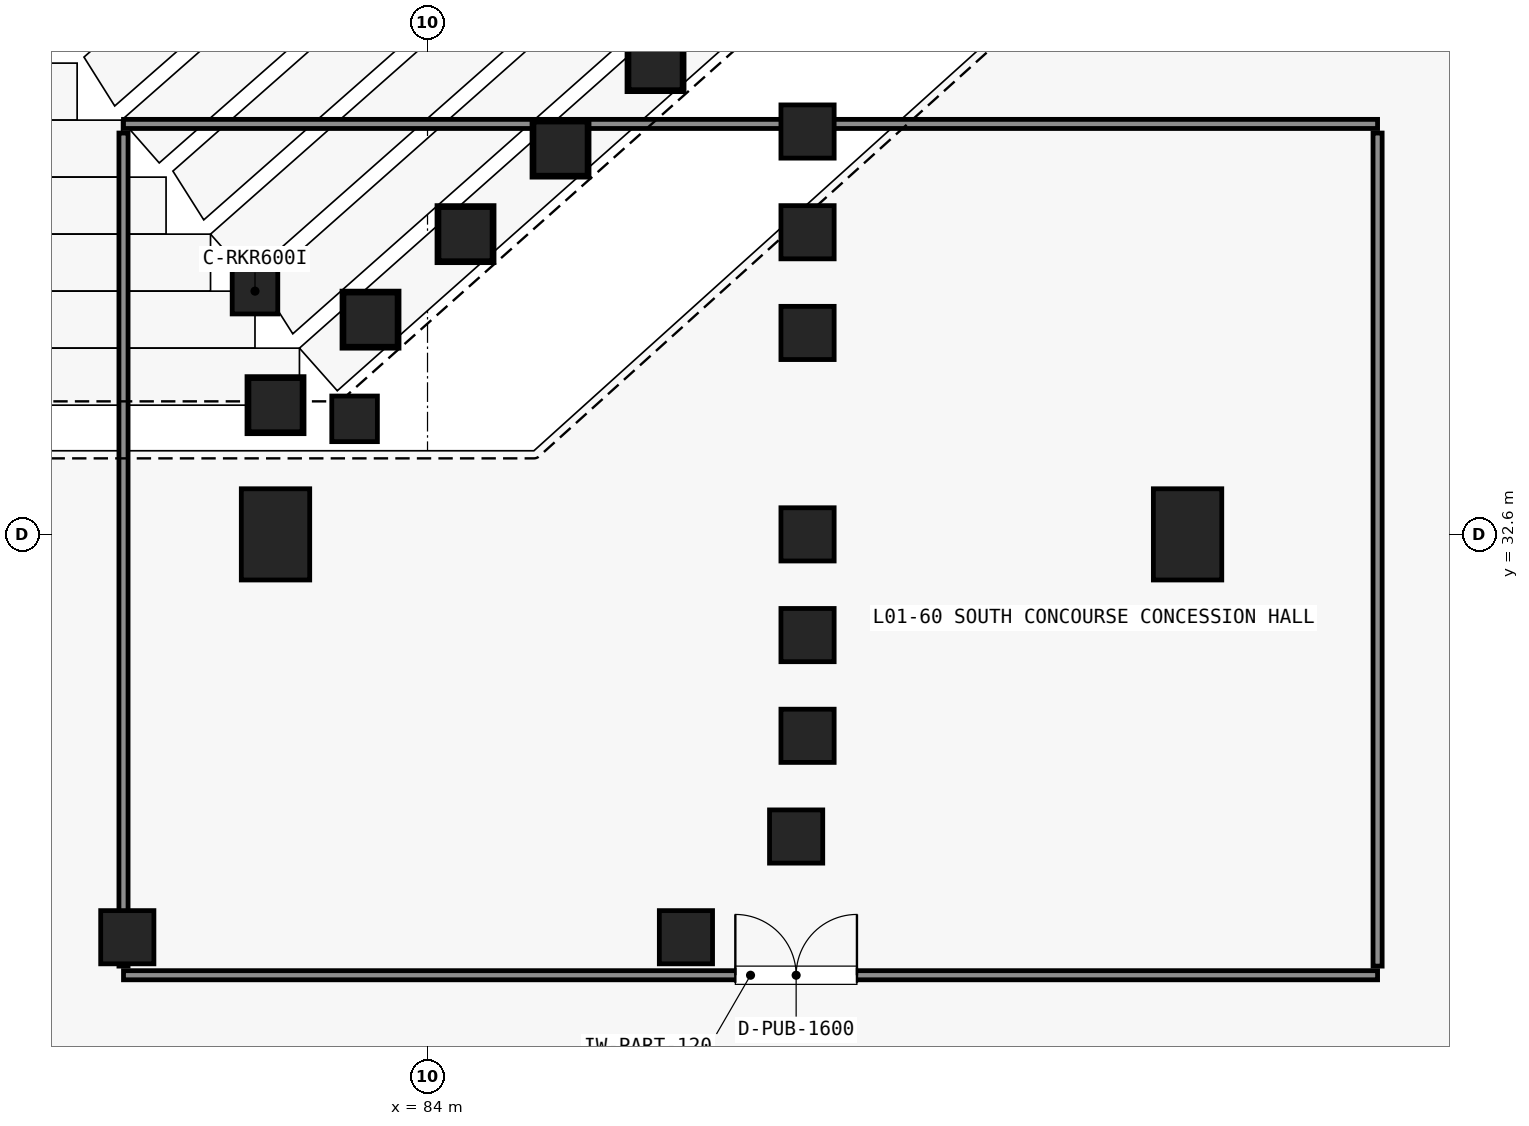
"""IFC4 building model, lengths in metres.
Left out: names, types, materials, properties, quantities, classifications, styles, units other than length and angle.
Written with IfcOpenShell. Run it as: python <this file> out.ifc"""

import sys

from ifc_helpers import new_model, si_unit, direction, frame, frame_2d, origin, origin_2d, place, context, subcontext, project, spatial, rectangle, extrude, element, fill, save


model = new_model("IFC4")
c1 = context("Model", 3, precision=1e-05, world=origin(), true_north=direction((0.0, 1.0)))
c2 = subcontext(c1, "Body", "Model", "MODEL_VIEW")
j1 = project(units=[si_unit("LENGTHUNIT", "METRE"), si_unit("PLANEANGLEUNIT", "RADIAN")], contexts=[c1])
p1 = place(None, origin())
s1 = spatial("IfcSite", under=j1, at=p1, CompositionType="ELEMENT")
p2 = place(p1, origin())
s2 = spatial("IfcBuilding", under=s1, at=p2, CompositionType="ELEMENT")
p3 = place(p2, frame((0.0, 0.0, 6.0)))
s3 = spatial("IfcBuildingStorey", under=s2, at=p3, CompositionType="ELEMENT", Elevation=6.0)
for number, where, z_axis, x_axis in (
    (1, (82.0, 32.6, 0.0), (0.0, 0.0, 1.0), (1.0, 0.0, 0.0)),
    (2, (94.0, 32.6, 0.0), (0.0, 0.0, 1.0), (1.0, 0.0, 0.0)),
):
    element("IfcColumn", number, at=place(p3, frame(where, z_axis=z_axis, x_axis=x_axis)), inside=s3, PredefinedType="COLUMN", context=c2, shape_type="SweptSolid", body=[
        extrude(rectangle(XDim=0.9, YDim=1.2, at=origin_2d()), origin(), (0.0, 0.0, 1.0), 5.4),
    ])
p4 = place(p3, frame((80.05, 27.3, 0.0), z_axis=(0.0, 0.0, 1.0), x_axis=(1.0, 0.0, 0.0)))
e3 = element("IfcColumn", 3, at=p4, inside=s3, PredefinedType="COLUMN", context=c2, shape_type="SweptSolid", body=[
    extrude(rectangle(XDim=0.7, YDim=0.7, at=origin_2d()), origin(), (0.0, 0.0, 1.0), 5.4),
])
p5 = place(p3, frame((82.0, 34.3, 0.0), z_axis=(0.0, 0.0, 1.0), x_axis=(1.0, 0.0, 0.0)))
e4 = element("IfcColumn", 4, at=p5, inside=s3, PredefinedType="COLUMN", context=c2, shape_type="SweptSolid", body=[
    extrude(rectangle(XDim=0.75, YDim=0.75, at=origin_2d()), origin(), (0.0, 0.0, 1.0), 2.55),
])
p6 = place(p3, frame((82.0, 34.3, 2.55), z_axis=(0.0, 0.0, 1.0), x_axis=(1.0, 0.0, 0.0)))
e5 = element("IfcColumn", 5, at=p6, inside=s3, PredefinedType="COLUMN", context=c2, shape_type="SweptSolid", body=[
    extrude(rectangle(XDim=0.7, YDim=0.7, at=origin_2d()), origin(), (0.0, 0.0, 1.0), 2.85),
])
p7 = place(p3, frame((87.4, 27.3, 0.0), z_axis=(0.0, 0.0, 1.0), x_axis=(1.0, 0.0, 0.0)))
e6 = element("IfcColumn", 6, at=p7, inside=s3, PredefinedType="COLUMN", context=c2, shape_type="SweptSolid", body=[
    extrude(rectangle(XDim=0.7, YDim=0.7, at=origin_2d()), origin(), (0.0, 0.0, 1.0), 5.4),
])
p8 = place(p3, frame((83.25, 35.425, 0.0), z_axis=(0.0, 0.0, 1.0), x_axis=(1.0, 0.0, 0.0)))
e7 = element("IfcColumn", 7, at=p8, inside=s3, PredefinedType="COLUMN", context=c2, shape_type="SweptSolid", body=[
    extrude(rectangle(XDim=0.75, YDim=0.75, at=origin_2d()), origin(), (0.0, 0.0, 1.0), 2.55),
])
p9 = place(p3, frame((83.25, 35.425, 2.55), z_axis=(0.0, 0.0, 1.0), x_axis=(1.0, 0.0, 0.0)))
e8 = element("IfcColumn", 8, at=p9, inside=s3, PredefinedType="COLUMN", context=c2, shape_type="SweptSolid", body=[
    extrude(rectangle(XDim=0.7, YDim=0.7, at=origin_2d()), origin(), (0.0, 0.0, 1.0), 2.85),
])
p10 = place(p3, frame((88.85, 28.625, 0.0), z_axis=(0.0, 0.0, 1.0), x_axis=(1.0, 0.0, 0.0)))
e9 = element("IfcColumn", 9, at=p10, inside=s3, PredefinedType="COLUMN", context=c2, shape_type="SweptSolid", body=[
    extrude(rectangle(XDim=0.7, YDim=0.7, at=origin_2d()), origin(), (0.0, 0.0, 1.0), 5.4),
])
p11 = place(p3, frame((84.5, 36.55, 0.0), z_axis=(0.0, 0.0, 1.0), x_axis=(1.0, 0.0, 0.0)))
e10 = element("IfcColumn", 10, at=p11, inside=s3, PredefinedType="COLUMN", context=c2, shape_type="SweptSolid", body=[
    extrude(rectangle(XDim=0.75, YDim=0.75, at=origin_2d()), origin(), (0.0, 0.0, 1.0), 2.55),
])
p12 = place(p3, frame((84.5, 36.55, 2.55), z_axis=(0.0, 0.0, 1.0), x_axis=(1.0, 0.0, 0.0)))
e11 = element("IfcColumn", 11, at=p12, inside=s3, PredefinedType="COLUMN", context=c2, shape_type="SweptSolid", body=[
    extrude(rectangle(XDim=0.7, YDim=0.7, at=origin_2d()), origin(), (0.0, 0.0, 1.0), 2.85),
])
p13 = place(p3, frame((89.0, 29.95, 0.0), z_axis=(0.0, 0.0, 1.0), x_axis=(1.0, 0.0, 0.0)))
e12 = element("IfcColumn", 12, at=p13, inside=s3, PredefinedType="COLUMN", context=c2, shape_type="SweptSolid", body=[
    extrude(rectangle(XDim=0.7, YDim=0.7, at=origin_2d()), origin(), (0.0, 0.0, 1.0), 5.4),
])
p14 = place(p3, frame((85.75, 37.675, 0.0), z_axis=(0.0, 0.0, 1.0), x_axis=(1.0, 0.0, 0.0)))
e13 = element("IfcColumn", 13, at=p14, inside=s3, PredefinedType="COLUMN", context=c2, shape_type="SweptSolid", body=[
    extrude(rectangle(XDim=0.75, YDim=0.75, at=origin_2d()), origin(), (0.0, 0.0, 1.0), 2.55),
])
p15 = place(p3, frame((85.75, 37.675, 2.55), z_axis=(0.0, 0.0, 1.0), x_axis=(1.0, 0.0, 0.0)))
e14 = element("IfcColumn", 14, at=p15, inside=s3, PredefinedType="COLUMN", context=c2, shape_type="SweptSolid", body=[
    extrude(rectangle(XDim=0.7, YDim=0.7, at=origin_2d()), origin(), (0.0, 0.0, 1.0), 2.85),
])
p16 = place(p3, frame((89.0, 31.275, 0.0), z_axis=(0.0, 0.0, 1.0), x_axis=(1.0, 0.0, 0.0)))
e15 = element("IfcColumn", 15, at=p16, inside=s3, PredefinedType="COLUMN", context=c2, shape_type="SweptSolid", body=[
    extrude(rectangle(XDim=0.7, YDim=0.7, at=origin_2d()), origin(), (0.0, 0.0, 1.0), 5.4),
])
p17 = place(p3, frame((87.0, 38.8, 0.0), z_axis=(0.0, 0.0, 1.0), x_axis=(1.0, 0.0, 0.0)))
e16 = element("IfcColumn", 16, at=p17, inside=s3, PredefinedType="COLUMN", context=c2, shape_type="SweptSolid", body=[
    extrude(rectangle(XDim=0.75, YDim=0.75, at=origin_2d()), origin(), (0.0, 0.0, 1.0), 2.55),
])
p18 = place(p3, frame((87.0, 38.8, 2.55), z_axis=(0.0, 0.0, 1.0), x_axis=(1.0, 0.0, 0.0)))
e17 = element("IfcColumn", 17, at=p18, inside=s3, PredefinedType="COLUMN", context=c2, shape_type="SweptSolid", body=[
    extrude(rectangle(XDim=0.7, YDim=0.7, at=origin_2d()), origin(), (0.0, 0.0, 1.0), 2.85),
])
for number, where, z_axis, x_axis in (
    (18, (89.0, 32.6, 0.0), (0.0, 0.0, 1.0), (1.0, 0.0, 0.0)),
    (19, (89.0, 35.25, 0.0), (0.0, 0.0, 1.0), (1.0, 0.0, 0.0)),
    (20, (89.0, 36.575, 0.0), (0.0, 0.0, 1.0), (1.0, 0.0, 0.0)),
    (21, (89.0, 37.9, 0.0), (0.0, 0.0, 1.0), (1.0, 0.0, 0.0)),
):
    element("IfcColumn", number, at=place(p3, frame(where, z_axis=z_axis, x_axis=x_axis)), inside=s3, PredefinedType="COLUMN", context=c2, shape_type="SweptSolid", body=[
        extrude(rectangle(XDim=0.7, YDim=0.7, at=origin_2d()), origin(), (0.0, 0.0, 1.0), 5.4),
    ])
p19 = place(p3, frame((81.73, 35.8, 0.0), z_axis=(0.0, 0.0, 1.0), x_axis=(1.0, 0.0, 0.0)))
e22 = element("IfcColumn", 22, at=p19, inside=s3, PredefinedType="COLUMN", context=c2, shape_type="SweptSolid", body=[
    extrude(rectangle(XDim=0.6, YDim=0.6, at=origin_2d()), origin(), (0.0, 0.0, 1.0), 1.895),
])
p20 = place(p3, frame((83.04, 34.12, 0.0), z_axis=(0.0, 0.0, 1.0), x_axis=(1.0, 0.0, 0.0)))
e23 = element("IfcColumn", 23, at=p20, inside=s3, PredefinedType="COLUMN", context=c2, shape_type="SweptSolid", body=[
    extrude(rectangle(XDim=0.6, YDim=0.6, at=origin_2d()), origin(), (0.0, 0.0, 1.0), 2.16),
])
p21 = place(p3, frame((94.0, 20.2, 0.0), z_axis=(0.0, 0.0, 1.0), x_axis=(0.72091340775, 0.693025149995, 0.0)))
e24 = element("IfcWall", 24, at=p21, inside=s3, PredefinedType="STANDARD", context=c2, shape_type="SweptSolid", body=[
    extrude(rectangle(XDim=12.553, YDim=0.28, at=frame_2d((6.277, 0.0))), origin(), (0.0, 0.0, 1.0), 5.04),
])
p22 = place(p21, frame((1.1, 0.0, 0.95)))
e25 = element("IfcOpeningElement", 25, at=p22, cuts=e24, PredefinedType="OPENING", context=c2, shape_type="SweptSolid", body=[
    extrude(rectangle(XDim=0.9, YDim=2.85, at=frame_2d((0.45, 1.425))), frame((0.0, 0.15, 0.0), z_axis=(0.0, -1.0, 0.0), x_axis=(1.0, 0.0, 0.0)), (0.0, 0.0, 1.0), 0.3),
])
p23 = place(p21, frame((2.45, 0.0, 0.95)))
e26 = element("IfcOpeningElement", 26, at=p23, cuts=e24, PredefinedType="OPENING", context=c2, shape_type="SweptSolid", body=[
    extrude(rectangle(XDim=0.9, YDim=2.85, at=frame_2d((0.45, 1.425))), frame((0.0, 0.15, 0.0), z_axis=(0.0, -1.0, 0.0), x_axis=(1.0, 0.0, 0.0)), (0.0, 0.0, 1.0), 0.3),
])
p24 = place(p21, frame((4.3, 0.0, 0.95)))
e27 = element("IfcOpeningElement", 27, at=p24, cuts=e24, PredefinedType="OPENING", context=c2, shape_type="SweptSolid", body=[
    extrude(rectangle(XDim=0.9, YDim=2.85, at=frame_2d((0.45, 1.425))), frame((0.0, 0.15, 0.0), z_axis=(0.0, -1.0, 0.0), x_axis=(1.0, 0.0, 0.0)), (0.0, 0.0, 1.0), 0.3),
])
p25 = place(p21, frame((5.65, 0.0, 0.95)))
e28 = element("IfcOpeningElement", 28, at=p25, cuts=e24, PredefinedType="OPENING", context=c2, shape_type="SweptSolid", body=[
    extrude(rectangle(XDim=0.9, YDim=2.85, at=frame_2d((0.45, 1.425))), frame((0.0, 0.15, 0.0), z_axis=(0.0, -1.0, 0.0), x_axis=(1.0, 0.0, 0.0)), (0.0, 0.0, 1.0), 0.3),
])
p26 = place(p21, frame((7.5, 0.0, 0.95)))
e29 = element("IfcOpeningElement", 29, at=p26, cuts=e24, PredefinedType="OPENING", context=c2, shape_type="SweptSolid", body=[
    extrude(rectangle(XDim=0.9, YDim=2.85, at=frame_2d((0.45, 1.425))), frame((0.0, 0.15, 0.0), z_axis=(0.0, -1.0, 0.0), x_axis=(1.0, 0.0, 0.0)), (0.0, 0.0, 1.0), 0.3),
])
p27 = place(p21, frame((8.85, 0.0, 0.95)))
e30 = element("IfcOpeningElement", 30, at=p27, cuts=e24, PredefinedType="OPENING", context=c2, shape_type="SweptSolid", body=[
    extrude(rectangle(XDim=0.9, YDim=2.85, at=frame_2d((0.45, 1.425))), frame((0.0, 0.15, 0.0), z_axis=(0.0, -1.0, 0.0), x_axis=(1.0, 0.0, 0.0)), (0.0, 0.0, 1.0), 0.3),
])
p28 = place(p3, frame((80.0, 26.8, 0.0), z_axis=(0.0, 0.0, 1.0), x_axis=(1.0, 0.0, 0.0)))
e31 = element("IfcWall", 31, at=p28, inside=s3, PredefinedType="PARTITIONING", context=c2, shape_type="SweptSolid", body=[
    extrude(rectangle(XDim=16.5, YDim=0.12, at=frame_2d((8.25, 0.0))), origin(), (0.0, 0.0, 1.0), 2.775),
])
p29 = place(p28, frame((8.05, 0.0, 0.0)))
e32 = element("IfcOpeningElement", 32, at=p29, cuts=e31, PredefinedType="OPENING", context=c2, shape_type="SweptSolid", body=[
    extrude(rectangle(XDim=1.6, YDim=2.25, at=frame_2d((0.8, 1.125))), frame((0.0, 0.07, 0.0), z_axis=(0.0, -1.0, 0.0), x_axis=(1.0, 0.0, 0.0)), (0.0, 0.0, 1.0), 0.14),
])
p30 = place(p3, frame((80.0, 38.0, 0.0), z_axis=(0.0, 0.0, 1.0), x_axis=(1.0, 0.0, 0.0)))
e33 = element("IfcWall", 33, at=p30, inside=s3, PredefinedType="PARTITIONING", context=c2, shape_type="SweptSolid", body=[
    extrude(rectangle(XDim=16.5, YDim=0.12, at=frame_2d((8.25, 0.0))), origin(), (0.0, 0.0, 1.0), 5.04),
])
p31 = place(p3, frame((80.0, 26.92, 0.0), z_axis=(0.0, 0.0, 1.0), x_axis=(0.0, 1.0, 0.0)))
e34 = element("IfcWall", 34, at=p31, inside=s3, PredefinedType="PARTITIONING", context=c2, shape_type="SweptSolid", body=[
    extrude(rectangle(XDim=10.96, YDim=0.12, at=frame_2d((5.48, 0.0))), origin(), (0.0, 0.0, 1.0), 2.775),
])
p32 = place(p3, frame((96.5, 26.92, 0.0), z_axis=(0.0, 0.0, 1.0), x_axis=(0.0, 1.0, 0.0)))
e35 = element("IfcWall", 35, at=p32, inside=s3, PredefinedType="PARTITIONING", context=c2, shape_type="SweptSolid", body=[
    extrude(rectangle(XDim=10.96, YDim=0.12, at=frame_2d((5.48, 0.0))), origin(), (0.0, 0.0, 1.0), 5.04),
])
p33 = place(p29, origin())
e36 = element("IfcDoor", 36, at=p33, inside=s3, OperationType="DOUBLE_DOOR_SINGLE_SWING", PredefinedType="DOOR", context=c2, shape_type="SweptSolid", body=[
    extrude(rectangle(XDim=1.6, YDim=2.25, at=frame_2d((0.8, 1.125))), frame((0.0, 0.025, 0.0), z_axis=(0.0, -1.0, 0.0), x_axis=(1.0, 0.0, 0.0)), (0.0, 0.0, 1.0), 0.05),
])
fill(e32, e36)
save(model, sys.argv[1])
